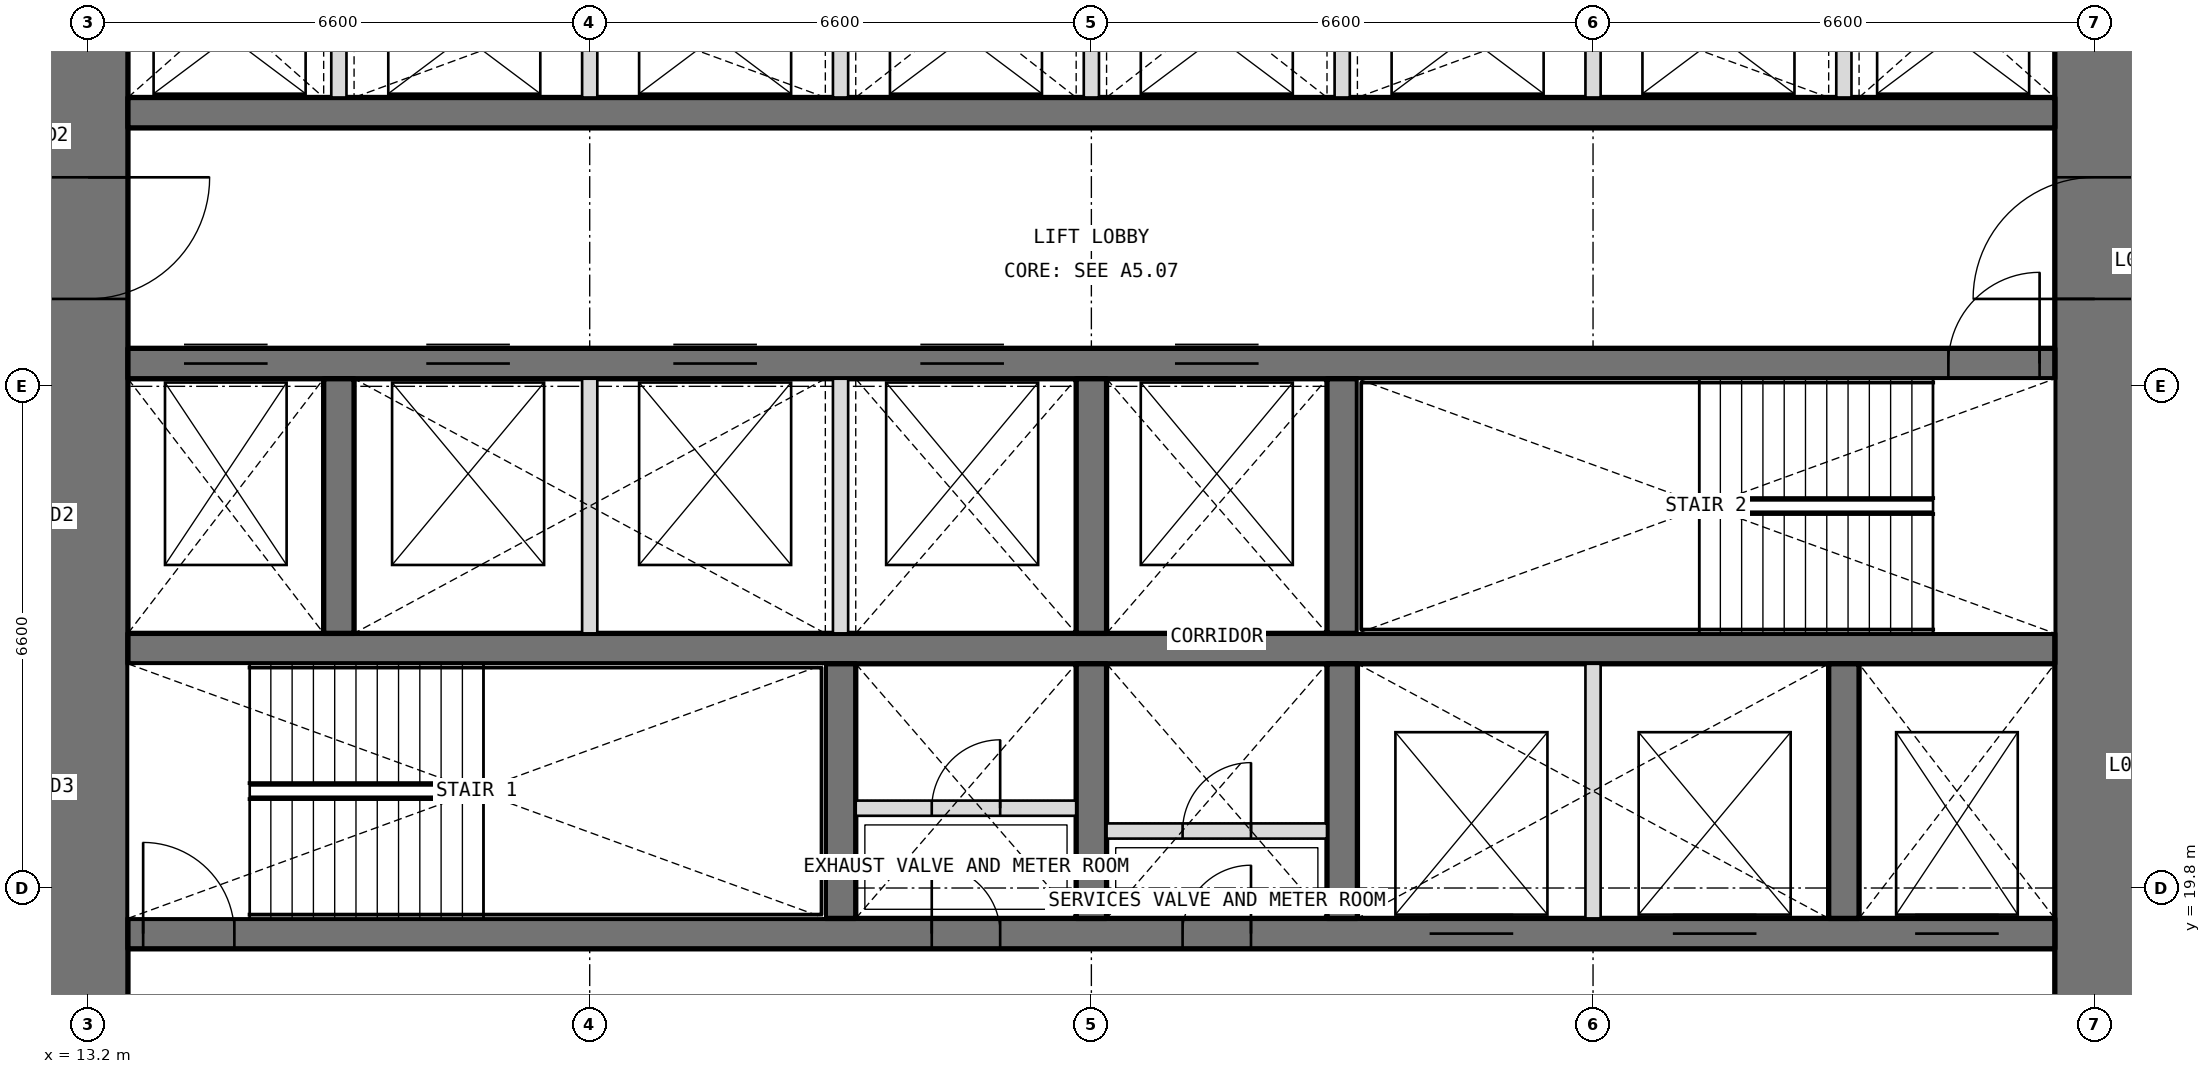
"""IFC4 building model, lengths in metres.
Left out: names, types, materials, properties, quantities, classifications, styles, units other than length and angle.
Written with IfcOpenShell. Run it as: python <this file> out.ifc"""

import sys

from ifc_helpers import new_model, si_unit, direction, frame, frame_2d, origin, place, context, subcontext, project, spatial, rectangle, extrude, element, fill, save


model = new_model("IFC4")
c1 = context("Model", 3, precision=1e-05, world=origin(), true_north=direction((0.0, 1.0)))
c2 = subcontext(c1, "Body", "Model", "MODEL_VIEW")
j1 = project(units=[si_unit("LENGTHUNIT", "METRE"), si_unit("PLANEANGLEUNIT", "RADIAN")], contexts=[c1])
p1 = place(None, origin())
s1 = spatial("IfcSite", under=j1, at=p1, CompositionType="ELEMENT")
p2 = place(p1, origin())
s2 = spatial("IfcBuilding", under=s1, at=p2, CompositionType="ELEMENT")
p3 = place(p2, frame((0.0, 0.0, 25.5)))
s3 = spatial("IfcBuildingStorey", under=s2, at=p3, CompositionType="ELEMENT", Elevation=25.5)
p4 = place(p3, frame((39.6, 13.725, 0.0), z_axis=(0.0, 0.0, 1.0), x_axis=(0.0, 1.0, 0.0)))
e1 = element("IfcWall", 1, at=p4, inside=s3, PredefinedType="SHEAR", context=c2, shape_type="SweptSolid", body=[
    extrude(rectangle(XDim=18.75, YDim=1.05, at=frame_2d((9.375, 0.0))), origin(), (0.0, 0.0, 1.0), 4.2),
])
p5 = place(p4, frame((3.025, 0.0, 0.0)))
e2 = element("IfcOpeningElement", 2, at=p5, cuts=e1, PredefinedType="OPENING", context=c2, shape_type="SweptSolid", body=[
    extrude(rectangle(XDim=1.6, YDim=2.1, at=frame_2d((0.8, 1.05))), frame((0.0, 0.535, 0.0), z_axis=(0.0, -1.0, 0.0), x_axis=(1.0, 0.0, 0.0)), (0.0, 0.0, 1.0), 1.07),
])
p6 = place(p4, frame((13.825, 0.0, 0.0)))
e3 = element("IfcOpeningElement", 3, at=p6, cuts=e1, PredefinedType="OPENING", context=c2, shape_type="SweptSolid", body=[
    extrude(rectangle(XDim=1.6, YDim=2.1, at=frame_2d((0.8, 1.05))), frame((0.0, 0.535, 0.0), z_axis=(0.0, -1.0, 0.0), x_axis=(1.0, 0.0, 0.0)), (0.0, 0.0, 1.0), 1.07),
])
p7 = place(p3, frame((13.2, 32.475, 0.0), z_axis=(0.0, 0.0, 1.0), x_axis=(0.0, -1.0, 0.0)))
e4 = element("IfcWall", 4, at=p7, inside=s3, PredefinedType="SHEAR", context=c2, shape_type="SweptSolid", body=[
    extrude(rectangle(XDim=18.75, YDim=1.05, at=frame_2d((9.375, 0.0))), origin(), (0.0, 0.0, 1.0), 4.2),
])
p8 = place(p7, frame((14.125, 0.0, 0.0)))
e5 = element("IfcOpeningElement", 5, at=p8, cuts=e4, PredefinedType="OPENING", context=c2, shape_type="SweptSolid", body=[
    extrude(rectangle(XDim=1.6, YDim=2.1, at=frame_2d((0.8, 1.05))), frame((0.0, 0.535, 0.0), z_axis=(0.0, -1.0, 0.0), x_axis=(1.0, 0.0, 0.0)), (0.0, 0.0, 1.0), 1.07),
])
p9 = place(p7, frame((3.325, 0.0, 0.0)))
e6 = element("IfcOpeningElement", 6, at=p9, cuts=e4, PredefinedType="OPENING", context=c2, shape_type="SweptSolid", body=[
    extrude(rectangle(XDim=1.6, YDim=2.1, at=frame_2d((0.8, 1.05))), frame((0.0, 0.535, 0.0), z_axis=(0.0, -1.0, 0.0), x_axis=(1.0, 0.0, 0.0)), (0.0, 0.0, 1.0), 1.07),
])
p10 = place(p3, frame((13.725, 19.2, 0.0), z_axis=(0.0, 0.0, 1.0), x_axis=(1.0, 0.0, 0.0)))
e7 = element("IfcWall", 7, at=p10, inside=s3, PredefinedType="SHEAR", context=c2, shape_type="SweptSolid", body=[
    extrude(rectangle(XDim=25.35, YDim=0.4, at=frame_2d((12.675, 0.0))), origin(), (0.0, 0.0, 1.0), 4.2),
])
p11 = place(p10, frame((10.575, 0.0, 0.0)))
e8 = element("IfcOpeningElement", 8, at=p11, cuts=e7, PredefinedType="OPENING", context=c2, shape_type="SweptSolid", body=[
    extrude(rectangle(XDim=0.9, YDim=2.1, at=frame_2d((0.45, 1.05))), frame((0.0, 0.21, 0.0), z_axis=(0.0, -1.0, 0.0), x_axis=(1.0, 0.0, 0.0)), (0.0, 0.0, 1.0), 0.42),
])
p12 = place(p10, frame((13.875, 0.0, 0.0)))
e9 = element("IfcOpeningElement", 9, at=p12, cuts=e7, PredefinedType="OPENING", context=c2, shape_type="SweptSolid", body=[
    extrude(rectangle(XDim=0.9, YDim=2.1, at=frame_2d((0.45, 1.05))), frame((0.0, 0.21, 0.0), z_axis=(0.0, -1.0, 0.0), x_axis=(1.0, 0.0, 0.0)), (0.0, 0.0, 1.0), 0.42),
])
p13 = place(p10, frame((0.2, 0.0, 0.0)))
e10 = element("IfcOpeningElement", 10, at=p13, cuts=e7, PredefinedType="OPENING", context=c2, shape_type="SweptSolid", body=[
    extrude(rectangle(XDim=1.2, YDim=2.1, at=frame_2d((0.6, 1.05))), frame((0.0, 0.21, 0.0), z_axis=(0.0, -1.0, 0.0), x_axis=(1.0, 0.0, 0.0)), (0.0, 0.0, 1.0), 0.42),
])
p14 = place(p10, frame((23.512, 0.0, 0.0)))
e11 = element("IfcOpeningElement", 11, at=p14, cuts=e7, PredefinedType="OPENING", context=c2, shape_type="SweptSolid", body=[
    extrude(rectangle(XDim=1.1, YDim=2.1, at=frame_2d((0.55, 1.05))), frame((0.0, 0.21, 0.0), z_axis=(0.0, -1.0, 0.0), x_axis=(1.0, 0.0, 0.0)), (0.0, 0.0, 1.0), 0.42),
])
p15 = place(p10, frame((17.125, 0.0, 0.0)))
e12 = element("IfcOpeningElement", 12, at=p15, cuts=e7, PredefinedType="OPENING", context=c2, shape_type="SweptSolid", body=[
    extrude(rectangle(XDim=1.1, YDim=2.1, at=frame_2d((0.55, 1.05))), frame((0.0, 0.21, 0.0), z_axis=(0.0, -1.0, 0.0), x_axis=(1.0, 0.0, 0.0)), (0.0, 0.0, 1.0), 0.42),
])
p16 = place(p10, frame((20.325, 0.0, 0.0)))
e13 = element("IfcOpeningElement", 13, at=p16, cuts=e7, PredefinedType="OPENING", context=c2, shape_type="SweptSolid", body=[
    extrude(rectangle(XDim=1.1, YDim=2.1, at=frame_2d((0.55, 1.05))), frame((0.0, 0.21, 0.0), z_axis=(0.0, -1.0, 0.0), x_axis=(1.0, 0.0, 0.0)), (0.0, 0.0, 1.0), 0.42),
])
p17 = place(p3, frame((13.725, 22.95, 0.0), z_axis=(0.0, 0.0, 1.0), x_axis=(1.0, 0.0, 0.0)))
e14 = element("IfcWall", 14, at=p17, inside=s3, PredefinedType="SHEAR", context=c2, shape_type="SweptSolid", body=[
    extrude(rectangle(XDim=25.35, YDim=0.4, at=frame_2d((12.675, 0.0))), origin(), (0.0, 0.0, 1.0), 4.2),
])
p18 = place(p3, frame((13.725, 26.7, 0.0), z_axis=(0.0, 0.0, 1.0), x_axis=(1.0, 0.0, 0.0)))
e15 = element("IfcWall", 15, at=p18, inside=s3, PredefinedType="SHEAR", context=c2, shape_type="SweptSolid", body=[
    extrude(rectangle(XDim=25.35, YDim=0.4, at=frame_2d((12.675, 0.0))), origin(), (0.0, 0.0, 1.0), 4.2),
])
p19 = place(p18, frame((23.95, 0.0, 0.0)))
e16 = element("IfcOpeningElement", 16, at=p19, cuts=e15, PredefinedType="OPENING", context=c2, shape_type="SweptSolid", body=[
    extrude(rectangle(XDim=1.2, YDim=2.1, at=frame_2d((0.6, 1.05))), frame((0.0, 0.21, 0.0), z_axis=(0.0, -1.0, 0.0), x_axis=(1.0, 0.0, 0.0)), (0.0, 0.0, 1.0), 0.42),
])
p20 = place(p18, frame((0.738, 0.0, 0.0)))
e17 = element("IfcOpeningElement", 17, at=p20, cuts=e15, PredefinedType="OPENING", context=c2, shape_type="SweptSolid", body=[
    extrude(rectangle(XDim=1.1, YDim=2.1, at=frame_2d((0.55, 1.05))), frame((0.0, 0.21, 0.0), z_axis=(0.0, -1.0, 0.0), x_axis=(1.0, 0.0, 0.0)), (0.0, 0.0, 1.0), 0.42),
])
p21 = place(p18, frame((3.925, 0.0, 0.0)))
e18 = element("IfcOpeningElement", 18, at=p21, cuts=e15, PredefinedType="OPENING", context=c2, shape_type="SweptSolid", body=[
    extrude(rectangle(XDim=1.1, YDim=2.1, at=frame_2d((0.55, 1.05))), frame((0.0, 0.21, 0.0), z_axis=(0.0, -1.0, 0.0), x_axis=(1.0, 0.0, 0.0)), (0.0, 0.0, 1.0), 0.42),
])
p22 = place(p18, frame((7.175, 0.0, 0.0)))
e19 = element("IfcOpeningElement", 19, at=p22, cuts=e15, PredefinedType="OPENING", context=c2, shape_type="SweptSolid", body=[
    extrude(rectangle(XDim=1.1, YDim=2.1, at=frame_2d((0.55, 1.05))), frame((0.0, 0.21, 0.0), z_axis=(0.0, -1.0, 0.0), x_axis=(1.0, 0.0, 0.0)), (0.0, 0.0, 1.0), 0.42),
])
p23 = place(p18, frame((10.425, 0.0, 0.0)))
e20 = element("IfcOpeningElement", 20, at=p23, cuts=e15, PredefinedType="OPENING", context=c2, shape_type="SweptSolid", body=[
    extrude(rectangle(XDim=1.1, YDim=2.1, at=frame_2d((0.55, 1.05))), frame((0.0, 0.21, 0.0), z_axis=(0.0, -1.0, 0.0), x_axis=(1.0, 0.0, 0.0)), (0.0, 0.0, 1.0), 0.42),
])
p24 = place(p18, frame((13.775, 0.0, 0.0)))
e21 = element("IfcOpeningElement", 21, at=p24, cuts=e15, PredefinedType="OPENING", context=c2, shape_type="SweptSolid", body=[
    extrude(rectangle(XDim=1.1, YDim=2.1, at=frame_2d((0.55, 1.05))), frame((0.0, 0.21, 0.0), z_axis=(0.0, -1.0, 0.0), x_axis=(1.0, 0.0, 0.0)), (0.0, 0.0, 1.0), 0.42),
])
p25 = place(p3, frame((13.725, 30.0, 0.0), z_axis=(0.0, 0.0, 1.0), x_axis=(1.0, 0.0, 0.0)))
e22 = element("IfcWall", 22, at=p25, inside=s3, PredefinedType="SHEAR", context=c2, shape_type="SweptSolid", body=[
    extrude(rectangle(XDim=25.35, YDim=0.4, at=frame_2d((12.675, 0.0))), origin(), (0.0, 0.0, 1.0), 4.2),
])
for number, where, z_axis, x_axis in (
    (23, (23.1, 19.4, 0.0), (0.0, 0.0, 1.0), (0.0, 1.0, 0.0)),
    (24, (26.4, 19.4, 0.0), (0.0, 0.0, 1.0), (0.0, 1.0, 0.0)),
    (25, (29.7, 19.4, 0.0), (0.0, 0.0, 1.0), (0.0, 1.0, 0.0)),
    (26, (36.3, 19.4, 0.0), (0.0, 0.0, 1.0), (0.0, 1.0, 0.0)),
    (27, (16.5, 23.15, 0.0), (0.0, 0.0, 1.0), (0.0, 1.0, 0.0)),
    (28, (26.4, 23.15, 0.0), (0.0, 0.0, 1.0), (0.0, 1.0, 0.0)),
    (29, (29.7, 23.15, 0.0), (0.0, 0.0, 1.0), (0.0, 1.0, 0.0)),
):
    element("IfcWall", number, at=place(p3, frame(where, z_axis=z_axis, x_axis=x_axis)), inside=s3, PredefinedType="SHEAR", context=c2, shape_type="SweptSolid", body=[
        extrude(rectangle(XDim=3.35, YDim=0.4, at=frame_2d((1.675, 0.0))), origin(), (0.0, 0.0, 1.0), 4.2),
    ])
for number, where, z_axis, x_axis in (
    (30, (16.5, 30.2, 0.0), (0.0, 0.0, 1.0), (0.0, 1.0, 0.0)),
    (31, (19.8, 30.2, 0.0), (0.0, 0.0, 1.0), (0.0, 1.0, 0.0)),
    (32, (23.1, 30.2, 0.0), (0.0, 0.0, 1.0), (0.0, 1.0, 0.0)),
    (33, (26.4, 30.2, 0.0), (0.0, 0.0, 1.0), (0.0, 1.0, 0.0)),
    (34, (29.7, 30.2, 0.0), (0.0, 0.0, 1.0), (0.0, 1.0, 0.0)),
    (35, (33.0, 30.2, 0.0), (0.0, 0.0, 1.0), (0.0, 1.0, 0.0)),
    (36, (36.3, 30.2, 0.0), (0.0, 0.0, 1.0), (0.0, 1.0, 0.0)),
):
    element("IfcWall", number, at=place(p3, frame(where, z_axis=z_axis, x_axis=x_axis)), inside=s3, PredefinedType="PARTITIONING", context=c2, shape_type="SweptSolid", body=[
        extrude(rectangle(XDim=2.275, YDim=0.2, at=frame_2d((1.138, 0.0))), origin(), (0.0, 0.0, 1.0), 4.2),
    ])
for number, where, z_axis, x_axis in (
    (37, (33.0, 19.4, 0.0), (0.0, 0.0, 1.0), (0.0, 1.0, 0.0)),
    (38, (19.8, 23.15, 0.0), (0.0, 0.0, 1.0), (0.0, 1.0, 0.0)),
    (39, (23.1, 23.15, 0.0), (0.0, 0.0, 1.0), (0.0, 1.0, 0.0)),
):
    element("IfcWall", number, at=place(p3, frame(where, z_axis=z_axis, x_axis=x_axis)), inside=s3, PredefinedType="PARTITIONING", context=c2, shape_type="SweptSolid", body=[
        extrude(rectangle(XDim=3.35, YDim=0.2, at=frame_2d((1.675, 0.0))), origin(), (0.0, 0.0, 1.0), 4.2),
    ])
p26 = place(p3, frame((23.3, 20.85, 0.0), z_axis=(0.0, 0.0, 1.0), x_axis=(1.0, 0.0, 0.0)))
e40 = element("IfcWall", 40, at=p26, inside=s3, PredefinedType="PARTITIONING", context=c2, shape_type="SweptSolid", body=[
    extrude(rectangle(XDim=2.9, YDim=0.2, at=frame_2d((1.45, 0.0))), origin(), (0.0, 0.0, 1.0), 3.9),
])
p27 = place(p26, frame((1.0, 0.0, 0.0)))
e41 = element("IfcOpeningElement", 41, at=p27, cuts=e40, PredefinedType="OPENING", context=c2, shape_type="SweptSolid", body=[
    extrude(rectangle(XDim=0.9, YDim=2.1, at=frame_2d((0.45, 1.05))), frame((0.0, 0.11, 0.0), z_axis=(0.0, -1.0, 0.0), x_axis=(1.0, 0.0, 0.0)), (0.0, 0.0, 1.0), 0.22),
])
p28 = place(p3, frame((26.6, 20.55, 0.0), z_axis=(0.0, 0.0, 1.0), x_axis=(1.0, 0.0, 0.0)))
e42 = element("IfcWall", 42, at=p28, inside=s3, PredefinedType="PARTITIONING", context=c2, shape_type="SweptSolid", body=[
    extrude(rectangle(XDim=2.9, YDim=0.2, at=frame_2d((1.45, 0.0))), origin(), (0.0, 0.0, 1.0), 3.9),
])
p29 = place(p28, frame((1.0, 0.0, 0.0)))
e43 = element("IfcOpeningElement", 43, at=p29, cuts=e42, PredefinedType="OPENING", context=c2, shape_type="SweptSolid", body=[
    extrude(rectangle(XDim=0.9, YDim=2.1, at=frame_2d((0.45, 1.05))), frame((0.0, 0.11, 0.0), z_axis=(0.0, -1.0, 0.0), x_axis=(1.0, 0.0, 0.0)), (0.0, 0.0, 1.0), 0.22),
])
p30 = place(p11, origin())
e44 = element("IfcDoor", 44, at=p30, inside=s3, OperationType="SINGLE_SWING_LEFT", PredefinedType="DOOR", context=c2, shape_type="SweptSolid", body=[
    extrude(rectangle(XDim=0.9, YDim=2.1, at=frame_2d((0.45, 1.05))), frame((0.0, 0.025, 0.0), z_axis=(0.0, -1.0, 0.0), x_axis=(1.0, 0.0, 0.0)), (0.0, 0.0, 1.0), 0.05),
])
fill(e8, e44)
p31 = place(p27, origin())
e45 = element("IfcDoor", 45, at=p31, inside=s3, OperationType="SINGLE_SWING_RIGHT", PredefinedType="DOOR", context=c2, shape_type="SweptSolid", body=[
    extrude(rectangle(XDim=0.9, YDim=2.1, at=frame_2d((0.45, 1.05))), frame((0.0, 0.025, 0.0), z_axis=(0.0, -1.0, 0.0), x_axis=(1.0, 0.0, 0.0)), (0.0, 0.0, 1.0), 0.05),
])
fill(e41, e45)
p32 = place(p12, origin())
e46 = element("IfcDoor", 46, at=p32, inside=s3, OperationType="SINGLE_SWING_RIGHT", PredefinedType="DOOR", context=c2, shape_type="SweptSolid", body=[
    extrude(rectangle(XDim=0.9, YDim=2.1, at=frame_2d((0.45, 1.05))), frame((0.0, 0.025, 0.0), z_axis=(0.0, -1.0, 0.0), x_axis=(1.0, 0.0, 0.0)), (0.0, 0.0, 1.0), 0.05),
])
fill(e9, e46)
p33 = place(p29, origin())
e47 = element("IfcDoor", 47, at=p33, inside=s3, OperationType="SINGLE_SWING_RIGHT", PredefinedType="DOOR", context=c2, shape_type="SweptSolid", body=[
    extrude(rectangle(XDim=0.9, YDim=2.1, at=frame_2d((0.45, 1.05))), frame((0.0, 0.025, 0.0), z_axis=(0.0, -1.0, 0.0), x_axis=(1.0, 0.0, 0.0)), (0.0, 0.0, 1.0), 0.05),
])
fill(e43, e47)
p34 = place(p13, origin())
e48 = element("IfcDoor", 48, at=p34, inside=s3, OperationType="SINGLE_SWING_LEFT", PredefinedType="DOOR", context=c2, shape_type="SweptSolid", body=[
    extrude(rectangle(XDim=1.2, YDim=2.1, at=frame_2d((0.6, 1.05))), frame((0.0, 0.025, 0.0), z_axis=(0.0, -1.0, 0.0), x_axis=(1.0, 0.0, 0.0)), (0.0, 0.0, 1.0), 0.05),
])
fill(e10, e48)
p35 = place(p19, origin())
e49 = element("IfcDoor", 49, at=p35, inside=s3, OperationType="SINGLE_SWING_RIGHT", PredefinedType="DOOR", context=c2, shape_type="SweptSolid", body=[
    extrude(rectangle(XDim=1.2, YDim=2.1, at=frame_2d((0.6, 1.05))), frame((0.0, 0.025, 0.0), z_axis=(0.0, -1.0, 0.0), x_axis=(1.0, 0.0, 0.0)), (0.0, 0.0, 1.0), 0.05),
])
fill(e16, e49)
p36 = place(p9, origin())
e50 = element("IfcDoor", 50, at=p36, inside=s3, OperationType="DOUBLE_DOOR_DOUBLE_SWING", PredefinedType="DOOR", context=c2, shape_type="SweptSolid", body=[
    extrude(rectangle(XDim=1.6, YDim=2.1, at=frame_2d((0.8, 1.05))), frame((0.0, 0.025, 0.0), z_axis=(0.0, -1.0, 0.0), x_axis=(1.0, 0.0, 0.0)), (0.0, 0.0, 1.0), 0.05),
])
fill(e6, e50)
p37 = place(p6, origin())
e51 = element("IfcDoor", 51, at=p37, inside=s3, OperationType="DOUBLE_DOOR_DOUBLE_SWING", PredefinedType="DOOR", context=c2, shape_type="SweptSolid", body=[
    extrude(rectangle(XDim=1.6, YDim=2.1, at=frame_2d((0.8, 1.05))), frame((0.0, 0.025, 0.0), z_axis=(0.0, -1.0, 0.0), x_axis=(1.0, 0.0, 0.0)), (0.0, 0.0, 1.0), 0.05),
])
fill(e3, e51)
p38 = place(p20, origin())
e52 = element("IfcDoor", 52, at=p38, inside=s3, OperationType="DOUBLE_DOOR_SLIDING", PredefinedType="DOOR", context=c2, shape_type="SweptSolid", body=[
    extrude(rectangle(XDim=1.1, YDim=2.1, at=frame_2d((0.55, 1.05))), frame((0.0, 0.025, 0.0), z_axis=(0.0, -1.0, 0.0), x_axis=(1.0, 0.0, 0.0)), (0.0, 0.0, 1.0), 0.05),
])
fill(e17, e52)
p39 = place(p14, origin())
e53 = element("IfcDoor", 53, at=p39, inside=s3, OperationType="DOUBLE_DOOR_SLIDING", PredefinedType="DOOR", context=c2, shape_type="SweptSolid", body=[
    extrude(rectangle(XDim=1.1, YDim=2.1, at=frame_2d((0.55, 1.05))), frame((0.0, 0.025, 0.0), z_axis=(0.0, -1.0, 0.0), x_axis=(1.0, 0.0, 0.0)), (0.0, 0.0, 1.0), 0.05),
])
fill(e11, e53)
p40 = place(p15, origin())
e54 = element("IfcDoor", 54, at=p40, inside=s3, OperationType="DOUBLE_DOOR_SLIDING", PredefinedType="DOOR", context=c2, shape_type="SweptSolid", body=[
    extrude(rectangle(XDim=1.1, YDim=2.1, at=frame_2d((0.55, 1.05))), frame((0.0, 0.025, 0.0), z_axis=(0.0, -1.0, 0.0), x_axis=(1.0, 0.0, 0.0)), (0.0, 0.0, 1.0), 0.05),
])
fill(e12, e54)
p41 = place(p16, origin())
e55 = element("IfcDoor", 55, at=p41, inside=s3, OperationType="DOUBLE_DOOR_SLIDING", PredefinedType="DOOR", context=c2, shape_type="SweptSolid", body=[
    extrude(rectangle(XDim=1.1, YDim=2.1, at=frame_2d((0.55, 1.05))), frame((0.0, 0.025, 0.0), z_axis=(0.0, -1.0, 0.0), x_axis=(1.0, 0.0, 0.0)), (0.0, 0.0, 1.0), 0.05),
])
fill(e13, e55)
p42 = place(p21, origin())
e56 = element("IfcDoor", 56, at=p42, inside=s3, OperationType="DOUBLE_DOOR_SLIDING", PredefinedType="DOOR", context=c2, shape_type="SweptSolid", body=[
    extrude(rectangle(XDim=1.1, YDim=2.1, at=frame_2d((0.55, 1.05))), frame((0.0, 0.025, 0.0), z_axis=(0.0, -1.0, 0.0), x_axis=(1.0, 0.0, 0.0)), (0.0, 0.0, 1.0), 0.05),
])
fill(e18, e56)
p43 = place(p22, origin())
e57 = element("IfcDoor", 57, at=p43, inside=s3, OperationType="DOUBLE_DOOR_SLIDING", PredefinedType="DOOR", context=c2, shape_type="SweptSolid", body=[
    extrude(rectangle(XDim=1.1, YDim=2.1, at=frame_2d((0.55, 1.05))), frame((0.0, 0.025, 0.0), z_axis=(0.0, -1.0, 0.0), x_axis=(1.0, 0.0, 0.0)), (0.0, 0.0, 1.0), 0.05),
])
fill(e19, e57)
p44 = place(p23, origin())
e58 = element("IfcDoor", 58, at=p44, inside=s3, OperationType="DOUBLE_DOOR_SLIDING", PredefinedType="DOOR", context=c2, shape_type="SweptSolid", body=[
    extrude(rectangle(XDim=1.1, YDim=2.1, at=frame_2d((0.55, 1.05))), frame((0.0, 0.025, 0.0), z_axis=(0.0, -1.0, 0.0), x_axis=(1.0, 0.0, 0.0)), (0.0, 0.0, 1.0), 0.05),
])
fill(e20, e58)
p45 = place(p24, origin())
e59 = element("IfcDoor", 59, at=p45, inside=s3, OperationType="DOUBLE_DOOR_SLIDING", PredefinedType="DOOR", context=c2, shape_type="SweptSolid", body=[
    extrude(rectangle(XDim=1.1, YDim=2.1, at=frame_2d((0.55, 1.05))), frame((0.0, 0.025, 0.0), z_axis=(0.0, -1.0, 0.0), x_axis=(1.0, 0.0, 0.0)), (0.0, 0.0, 1.0), 0.05),
])
fill(e21, e59)
save(model, sys.argv[1])
